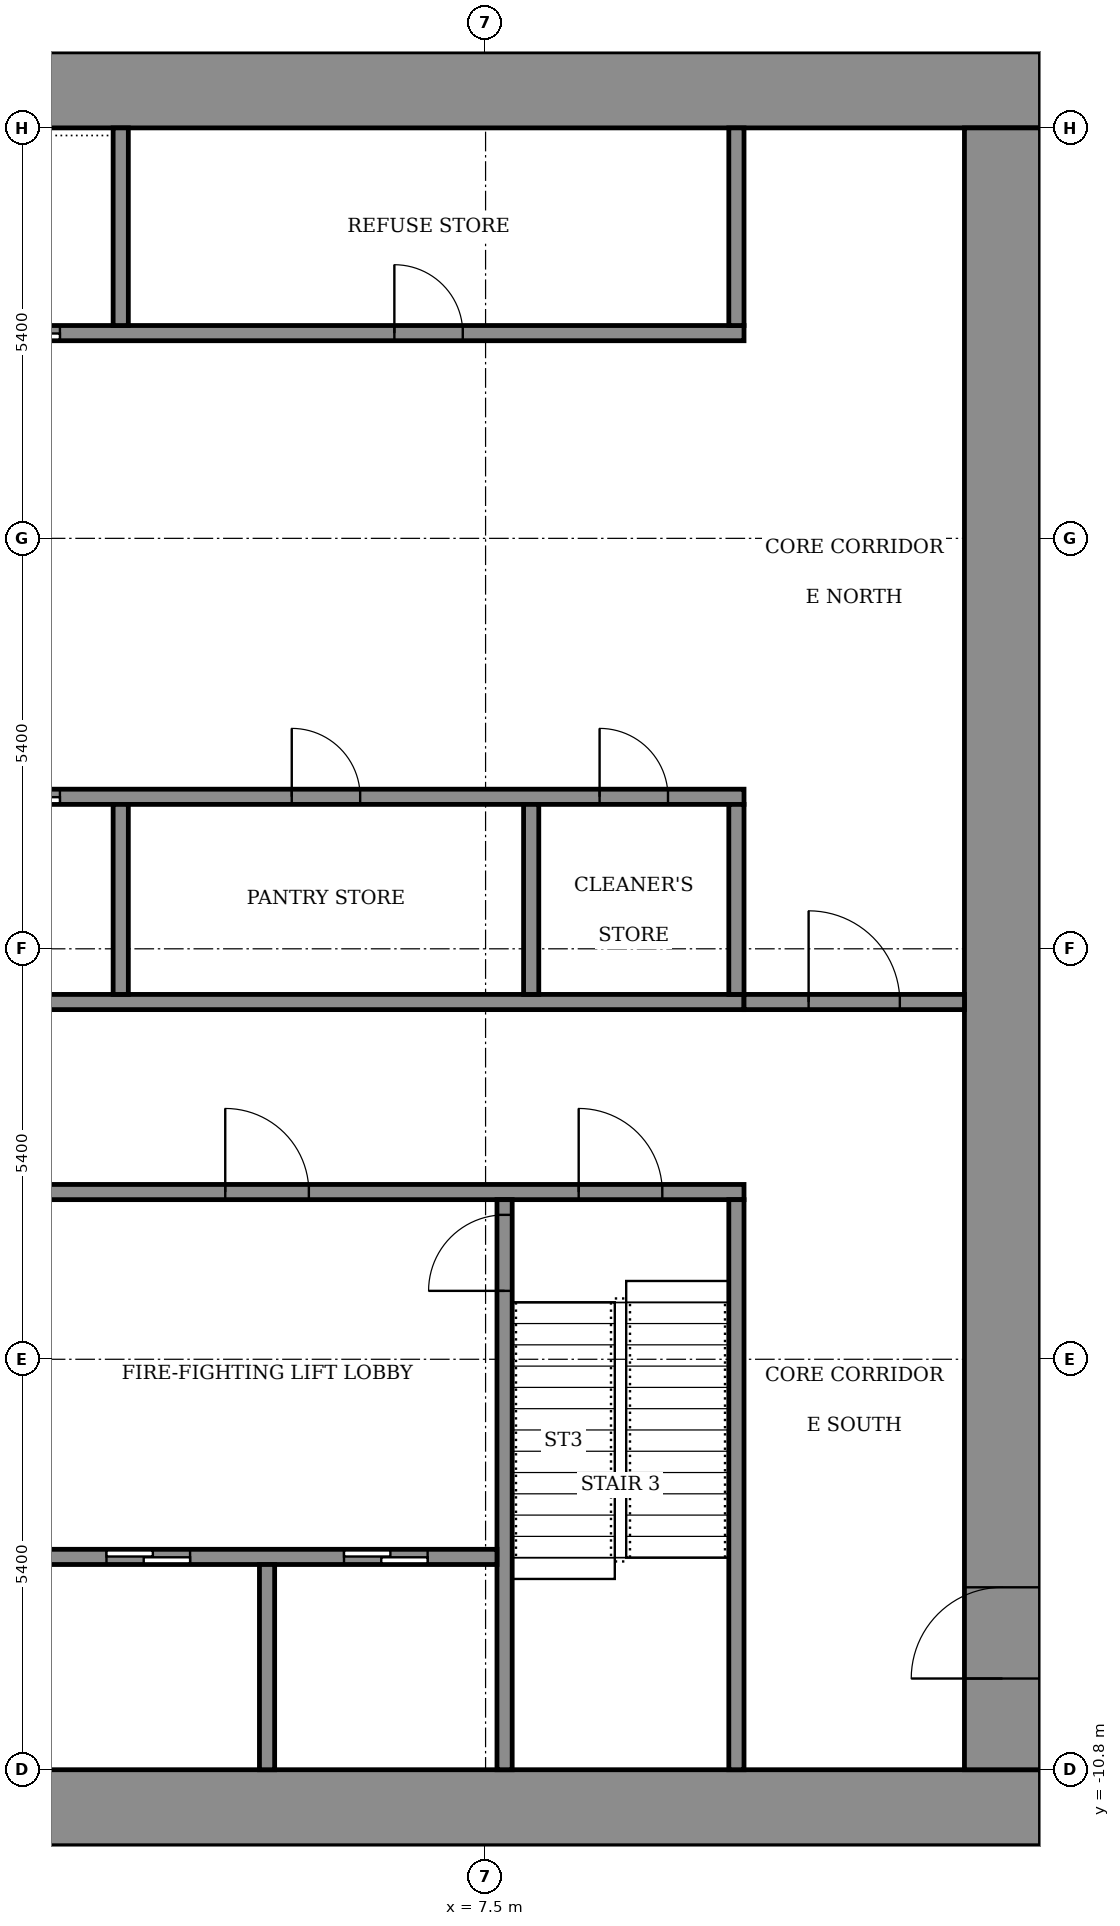
"""IFC4 building model, lengths in metres.
Left out: names, types, materials, properties, quantities, classifications, styles, units other than length and angle.
Written with IfcOpenShell. Run it as: python <this file> out.ifc"""

import sys

from ifc_helpers import new_model, si_unit, direction, frame, frame_2d, origin, place, context, subcontext, project, spatial, rectangle, extrude, element, fill, save


model = new_model("IFC4")
c1 = context("Model", 3, precision=1e-05, world=origin(), true_north=direction((0.0, 1.0)))
c2 = subcontext(c1, "Body", "Model", "MODEL_VIEW")
j1 = project(units=[si_unit("LENGTHUNIT", "METRE"), si_unit("PLANEANGLEUNIT", "RADIAN")], contexts=[c1])
p1 = place(None, origin())
s1 = spatial("IfcSite", under=j1, at=p1, CompositionType="ELEMENT")
p2 = place(p1, origin())
s2 = spatial("IfcBuilding", under=s1, at=p2, CompositionType="ELEMENT")
p3 = place(p2, frame((0.0, 0.0, 97.3)))
s3 = spatial("IfcBuildingStorey", under=s2, at=p3, CompositionType="ELEMENT", Elevation=97.3)
for number, where, z_axis, x_axis in (
    (1, (-14.8, -11.3, 0.0), (0.0, 0.0, 1.0), (1.0, 0.0, 0.0)),
    (2, (-14.8, 11.3, 0.0), (0.0, 0.0, 1.0), (1.0, 0.0, 0.0)),
):
    element("IfcWall", number, at=place(p3, frame(where, z_axis=z_axis, x_axis=x_axis)), inside=s3, PredefinedType="SHEAR", context=c2, shape_type="SweptSolid", body=[
        extrude(rectangle(XDim=29.6, YDim=1.0, at=frame_2d((14.8, 0.0))), origin(), (0.0, 0.0, 1.0), 4.6),
    ])
p4 = place(p3, frame((14.3, -10.8, 0.0), z_axis=(0.0, 0.0, 1.0), x_axis=(0.0, 1.0, 0.0)))
e3 = element("IfcWall", 3, at=p4, inside=s3, PredefinedType="SHEAR", context=c2, shape_type="SweptSolid", body=[
    extrude(rectangle(XDim=21.6, YDim=1.0, at=frame_2d((10.8, 0.0))), origin(), (0.0, 0.0, 1.0), 4.6),
])
p5 = place(p4, frame((1.2, 0.0, 0.0)))
e4 = element("IfcOpeningElement", 4, at=p5, cuts=e3, PredefinedType="OPENING", context=c2, shape_type="SweptSolid", body=[
    extrude(rectangle(XDim=1.2, YDim=2.1, at=frame_2d((0.6, 1.05))), frame((0.0, 0.51, 0.0), z_axis=(0.0, -1.0, 0.0), x_axis=(1.0, 0.0, 0.0)), (0.0, 0.0, 1.0), 1.02),
])
p6 = place(p3, frame((-10.9, -3.2, 0.0), z_axis=(0.0, 0.0, 1.0), x_axis=(1.0, 0.0, 0.0)))
e5 = element("IfcWall", 5, at=p6, inside=s3, PredefinedType="SHEAR", context=c2, shape_type="SweptSolid", body=[
    extrude(rectangle(XDim=21.8, YDim=0.2, at=frame_2d((10.9, 0.0))), origin(), (0.0, 0.0, 1.0), 4.05),
])
p7 = place(p6, frame((1.075, 0.0, 0.0)))
e6 = element("IfcOpeningElement", 6, at=p7, cuts=e5, PredefinedType="OPENING", context=c2, shape_type="SweptSolid", body=[
    extrude(rectangle(XDim=1.1, YDim=2.1, at=frame_2d((0.55, 1.05))), frame((0.0, 0.11, 0.0), z_axis=(0.0, -1.0, 0.0), x_axis=(1.0, 0.0, 0.0)), (0.0, 0.0, 1.0), 0.22),
])
p8 = place(p6, frame((10.325, 0.0, 0.0)))
e7 = element("IfcOpeningElement", 7, at=p8, cuts=e5, PredefinedType="OPENING", context=c2, shape_type="SweptSolid", body=[
    extrude(rectangle(XDim=1.1, YDim=2.1, at=frame_2d((0.55, 1.05))), frame((0.0, 0.11, 0.0), z_axis=(0.0, -1.0, 0.0), x_axis=(1.0, 0.0, 0.0)), (0.0, 0.0, 1.0), 0.22),
])
p9 = place(p6, frame((19.625, 0.0, 0.0)))
e8 = element("IfcOpeningElement", 8, at=p9, cuts=e5, PredefinedType="OPENING", context=c2, shape_type="SweptSolid", body=[
    extrude(rectangle(XDim=1.1, YDim=2.1, at=frame_2d((0.55, 1.05))), frame((0.0, 0.11, 0.0), z_axis=(0.0, -1.0, 0.0), x_axis=(1.0, 0.0, 0.0)), (0.0, 0.0, 1.0), 0.22),
])
p10 = place(p6, frame((5.7, 0.0, 0.0)))
e9 = element("IfcOpeningElement", 9, at=p10, cuts=e5, PredefinedType="OPENING", context=c2, shape_type="SweptSolid", body=[
    extrude(rectangle(XDim=1.1, YDim=2.1, at=frame_2d((0.55, 1.05))), frame((0.0, 0.11, 0.0), z_axis=(0.0, -1.0, 0.0), x_axis=(1.0, 0.0, 0.0)), (0.0, 0.0, 1.0), 0.22),
])
p11 = place(p6, frame((14.975, 0.0, 0.0)))
e10 = element("IfcOpeningElement", 10, at=p11, cuts=e5, PredefinedType="OPENING", context=c2, shape_type="SweptSolid", body=[
    extrude(rectangle(XDim=1.1, YDim=2.1, at=frame_2d((0.55, 1.05))), frame((0.0, 0.11, 0.0), z_axis=(0.0, -1.0, 0.0), x_axis=(1.0, 0.0, 0.0)), (0.0, 0.0, 1.0), 0.22),
])
p12 = place(p3, frame((-10.9, -0.7, 0.0), z_axis=(0.0, 0.0, 1.0), x_axis=(1.0, 0.0, 0.0)))
e11 = element("IfcWall", 11, at=p12, inside=s3, PredefinedType="SHEAR", context=c2, shape_type="SweptSolid", body=[
    extrude(rectangle(XDim=21.8, YDim=0.2, at=frame_2d((10.9, 0.0))), origin(), (0.0, 0.0, 1.0), 4.05),
])
p13 = place(p3, frame((-10.9, 2.0, 0.0), z_axis=(0.0, 0.0, 1.0), x_axis=(1.0, 0.0, 0.0)))
e12 = element("IfcWall", 12, at=p13, inside=s3, PredefinedType="SHEAR", context=c2, shape_type="SweptSolid", body=[
    extrude(rectangle(XDim=21.8, YDim=0.2, at=frame_2d((10.9, 0.0))), origin(), (0.0, 0.0, 1.0), 4.05),
])
p14 = place(p13, frame((0.9, 0.0, 0.0)))
e13 = element("IfcOpeningElement", 13, at=p14, cuts=e12, PredefinedType="OPENING", context=c2, shape_type="SweptSolid", body=[
    extrude(rectangle(XDim=1.1, YDim=2.1, at=frame_2d((0.55, 1.05))), frame((0.0, 0.11, 0.0), z_axis=(0.0, -1.0, 0.0), x_axis=(1.0, 0.0, 0.0)), (0.0, 0.0, 1.0), 0.22),
])
p15 = place(p13, frame((3.6, 0.0, 0.0)))
e14 = element("IfcOpeningElement", 14, at=p15, cuts=e12, PredefinedType="OPENING", context=c2, shape_type="SweptSolid", body=[
    extrude(rectangle(XDim=1.1, YDim=2.1, at=frame_2d((0.55, 1.05))), frame((0.0, 0.11, 0.0), z_axis=(0.0, -1.0, 0.0), x_axis=(1.0, 0.0, 0.0)), (0.0, 0.0, 1.0), 0.22),
])
p16 = place(p13, frame((6.3, 0.0, 0.0)))
e15 = element("IfcOpeningElement", 15, at=p16, cuts=e12, PredefinedType="OPENING", context=c2, shape_type="SweptSolid", body=[
    extrude(rectangle(XDim=1.1, YDim=2.1, at=frame_2d((0.55, 1.05))), frame((0.0, 0.11, 0.0), z_axis=(0.0, -1.0, 0.0), x_axis=(1.0, 0.0, 0.0)), (0.0, 0.0, 1.0), 0.22),
])
p17 = place(p13, frame((9.0, 0.0, 0.0)))
e16 = element("IfcOpeningElement", 16, at=p17, cuts=e12, PredefinedType="OPENING", context=c2, shape_type="SweptSolid", body=[
    extrude(rectangle(XDim=1.1, YDim=2.1, at=frame_2d((0.55, 1.05))), frame((0.0, 0.11, 0.0), z_axis=(0.0, -1.0, 0.0), x_axis=(1.0, 0.0, 0.0)), (0.0, 0.0, 1.0), 0.22),
])
p18 = place(p13, frame((11.7, 0.0, 0.0)))
e17 = element("IfcOpeningElement", 17, at=p18, cuts=e12, PredefinedType="OPENING", context=c2, shape_type="SweptSolid", body=[
    extrude(rectangle(XDim=1.1, YDim=2.1, at=frame_2d((0.55, 1.05))), frame((0.0, 0.11, 0.0), z_axis=(0.0, -1.0, 0.0), x_axis=(1.0, 0.0, 0.0)), (0.0, 0.0, 1.0), 0.22),
])
p19 = place(p13, frame((15.85, 0.0, 0.0)))
e18 = element("IfcOpeningElement", 18, at=p19, cuts=e12, PredefinedType="OPENING", context=c2, shape_type="SweptSolid", body=[
    extrude(rectangle(XDim=0.9, YDim=2.1, at=frame_2d((0.45, 1.05))), frame((0.0, 0.11, 0.0), z_axis=(0.0, -1.0, 0.0), x_axis=(1.0, 0.0, 0.0)), (0.0, 0.0, 1.0), 0.22),
])
p20 = place(p13, frame((19.9, 0.0, 0.0)))
e19 = element("IfcOpeningElement", 19, at=p20, cuts=e12, PredefinedType="OPENING", context=c2, shape_type="SweptSolid", body=[
    extrude(rectangle(XDim=0.9, YDim=2.1, at=frame_2d((0.45, 1.05))), frame((0.0, 0.11, 0.0), z_axis=(0.0, -1.0, 0.0), x_axis=(1.0, 0.0, 0.0)), (0.0, 0.0, 1.0), 0.22),
])
p21 = place(p3, frame((-10.9, 8.1, 0.0), z_axis=(0.0, 0.0, 1.0), x_axis=(1.0, 0.0, 0.0)))
e20 = element("IfcWall", 20, at=p21, inside=s3, PredefinedType="SHEAR", context=c2, shape_type="SweptSolid", body=[
    extrude(rectangle(XDim=21.8, YDim=0.2, at=frame_2d((10.9, 0.0))), origin(), (0.0, 0.0, 1.0), 4.05),
])
p22 = place(p21, frame((0.9, 0.0, 0.0)))
e21 = element("IfcOpeningElement", 21, at=p22, cuts=e20, PredefinedType="OPENING", context=c2, shape_type="SweptSolid", body=[
    extrude(rectangle(XDim=1.1, YDim=2.1, at=frame_2d((0.55, 1.05))), frame((0.0, 0.11, 0.0), z_axis=(0.0, -1.0, 0.0), x_axis=(1.0, 0.0, 0.0)), (0.0, 0.0, 1.0), 0.22),
])
p23 = place(p21, frame((3.6, 0.0, 0.0)))
e22 = element("IfcOpeningElement", 22, at=p23, cuts=e20, PredefinedType="OPENING", context=c2, shape_type="SweptSolid", body=[
    extrude(rectangle(XDim=1.1, YDim=2.1, at=frame_2d((0.55, 1.05))), frame((0.0, 0.11, 0.0), z_axis=(0.0, -1.0, 0.0), x_axis=(1.0, 0.0, 0.0)), (0.0, 0.0, 1.0), 0.22),
])
p24 = place(p21, frame((6.3, 0.0, 0.0)))
e23 = element("IfcOpeningElement", 23, at=p24, cuts=e20, PredefinedType="OPENING", context=c2, shape_type="SweptSolid", body=[
    extrude(rectangle(XDim=1.1, YDim=2.1, at=frame_2d((0.55, 1.05))), frame((0.0, 0.11, 0.0), z_axis=(0.0, -1.0, 0.0), x_axis=(1.0, 0.0, 0.0)), (0.0, 0.0, 1.0), 0.22),
])
p25 = place(p21, frame((9.0, 0.0, 0.0)))
e24 = element("IfcOpeningElement", 24, at=p25, cuts=e20, PredefinedType="OPENING", context=c2, shape_type="SweptSolid", body=[
    extrude(rectangle(XDim=1.1, YDim=2.1, at=frame_2d((0.55, 1.05))), frame((0.0, 0.11, 0.0), z_axis=(0.0, -1.0, 0.0), x_axis=(1.0, 0.0, 0.0)), (0.0, 0.0, 1.0), 0.22),
])
p26 = place(p21, frame((11.7, 0.0, 0.0)))
e25 = element("IfcOpeningElement", 25, at=p26, cuts=e20, PredefinedType="OPENING", context=c2, shape_type="SweptSolid", body=[
    extrude(rectangle(XDim=1.1, YDim=2.1, at=frame_2d((0.55, 1.05))), frame((0.0, 0.11, 0.0), z_axis=(0.0, -1.0, 0.0), x_axis=(1.0, 0.0, 0.0)), (0.0, 0.0, 1.0), 0.22),
])
p27 = place(p21, frame((17.2, 0.0, 0.0)))
e26 = element("IfcOpeningElement", 26, at=p27, cuts=e20, PredefinedType="OPENING", context=c2, shape_type="SweptSolid", body=[
    extrude(rectangle(XDim=0.9, YDim=2.1, at=frame_2d((0.45, 1.05))), frame((0.0, 0.11, 0.0), z_axis=(0.0, -1.0, 0.0), x_axis=(1.0, 0.0, 0.0)), (0.0, 0.0, 1.0), 0.22),
])
p28 = place(p3, frame((7.75, -10.8, 0.0), z_axis=(0.0, 0.0, 1.0), x_axis=(0.0, 1.0, 0.0)))
e27 = element("IfcWall", 27, at=p28, inside=s3, PredefinedType="SHEAR", context=c2, shape_type="SweptSolid", body=[
    extrude(rectangle(XDim=7.5, YDim=0.2, at=frame_2d((3.75, 0.0))), origin(), (0.0, 0.0, 1.0), 4.05),
])
p29 = place(p28, frame((6.3, 0.0, 0.0)))
e28 = element("IfcOpeningElement", 28, at=p29, cuts=e27, PredefinedType="OPENING", context=c2, shape_type="SweptSolid", body=[
    extrude(rectangle(XDim=1.0, YDim=2.1, at=frame_2d((0.5, 1.05))), frame((0.0, 0.11, 0.0), z_axis=(0.0, -1.0, 0.0), x_axis=(1.0, 0.0, 0.0)), (0.0, 0.0, 1.0), 0.22),
])
p30 = place(p3, frame((10.8, -10.8, 0.0), z_axis=(0.0, 0.0, 1.0), x_axis=(0.0, 1.0, 0.0)))
e29 = element("IfcWall", 29, at=p30, inside=s3, PredefinedType="SHEAR", context=c2, shape_type="SweptSolid", body=[
    extrude(rectangle(XDim=7.5, YDim=0.2, at=frame_2d((3.75, 0.0))), origin(), (0.0, 0.0, 1.0), 4.05),
])
p31 = place(p3, frame((1.6, -8.0, 0.0), z_axis=(0.0, 0.0, 1.0), x_axis=(1.0, 0.0, 0.0)))
e30 = element("IfcWall", 30, at=p31, inside=s3, PredefinedType="SHEAR", context=c2, shape_type="SweptSolid", body=[
    extrude(rectangle(XDim=6.05, YDim=0.2, at=frame_2d((3.025, 0.0))), origin(), (0.0, 0.0, 1.0), 4.05),
])
p32 = place(p31, frame((0.913, 0.0, 0.0)))
e31 = element("IfcOpeningElement", 31, at=p32, cuts=e30, PredefinedType="OPENING", context=c2, shape_type="SweptSolid", body=[
    extrude(rectangle(XDim=1.1, YDim=2.1, at=frame_2d((0.55, 1.05))), frame((0.0, 0.11, 0.0), z_axis=(0.0, -1.0, 0.0), x_axis=(1.0, 0.0, 0.0)), (0.0, 0.0, 1.0), 0.22),
])
p33 = place(p31, frame((4.038, 0.0, 0.0)))
e32 = element("IfcOpeningElement", 32, at=p33, cuts=e30, PredefinedType="OPENING", context=c2, shape_type="SweptSolid", body=[
    extrude(rectangle(XDim=1.1, YDim=2.1, at=frame_2d((0.55, 1.05))), frame((0.0, 0.11, 0.0), z_axis=(0.0, -1.0, 0.0), x_axis=(1.0, 0.0, 0.0)), (0.0, 0.0, 1.0), 0.22),
])
p34 = place(p3, frame((4.625, -10.8, 0.0), z_axis=(0.0, 0.0, 1.0), x_axis=(0.0, 1.0, 0.0)))
e33 = element("IfcWall", 33, at=p34, inside=s3, PredefinedType="SHEAR", context=c2, shape_type="SweptSolid", body=[
    extrude(rectangle(XDim=2.7, YDim=0.2, at=frame_2d((1.35, 0.0))), origin(), (0.0, 0.0, 1.0), 4.05),
])
p35 = place(p3, frame((2.7, -0.6, 0.0), z_axis=(0.0, 0.0, 1.0), x_axis=(0.0, 1.0, 0.0)))
e34 = element("IfcWall", 34, at=p35, inside=s3, PredefinedType="SHEAR", context=c2, shape_type="SweptSolid", body=[
    extrude(rectangle(XDim=2.5, YDim=0.2, at=frame_2d((1.25, 0.0))), origin(), (0.0, 0.0, 1.0), 4.05),
])
for number, where, z_axis, x_axis in (
    (35, (8.1, -0.6, 0.0), (0.0, 0.0, 1.0), (0.0, 1.0, 0.0)),
    (36, (10.8, -0.6, 0.0), (0.0, 0.0, 1.0), (0.0, 1.0, 0.0)),
):
    element("IfcWall", number, at=place(p3, frame(where, z_axis=z_axis, x_axis=x_axis)), inside=s3, PredefinedType="STANDARD", context=c2, shape_type="SweptSolid", body=[
        extrude(rectangle(XDim=2.5, YDim=0.2, at=frame_2d((1.25, 0.0))), origin(), (0.0, 0.0, 1.0), 4.05),
    ])
p36 = place(p3, frame((2.7, 8.2, 0.0), z_axis=(0.0, 0.0, 1.0), x_axis=(0.0, 1.0, 0.0)))
e37 = element("IfcWall", 37, at=p36, inside=s3, PredefinedType="SHEAR", context=c2, shape_type="SweptSolid", body=[
    extrude(rectangle(XDim=2.6, YDim=0.2, at=frame_2d((1.3, 0.0))), origin(), (0.0, 0.0, 1.0), 4.05),
])
p37 = place(p3, frame((10.8, 8.2, 0.0), z_axis=(0.0, 0.0, 1.0), x_axis=(0.0, 1.0, 0.0)))
e38 = element("IfcWall", 38, at=p37, inside=s3, PredefinedType="STANDARD", context=c2, shape_type="SweptSolid", body=[
    extrude(rectangle(XDim=2.6, YDim=0.2, at=frame_2d((1.3, 0.0))), origin(), (0.0, 0.0, 1.0), 4.05),
])
p38 = place(p3, frame((10.9, -0.7, 0.0), z_axis=(0.0, 0.0, 1.0), x_axis=(1.0, 0.0, 0.0)))
e39 = element("IfcWall", 39, at=p38, inside=s3, PredefinedType="STANDARD", context=c2, shape_type="SweptSolid", body=[
    extrude(rectangle(XDim=2.9, YDim=0.2, at=frame_2d((1.45, 0.0))), origin(), (0.0, 0.0, 1.0), 4.05),
])
p39 = place(p38, frame((0.85, 0.0, 0.0)))
e40 = element("IfcOpeningElement", 40, at=p39, cuts=e39, PredefinedType="OPENING", context=c2, shape_type="SweptSolid", body=[
    extrude(rectangle(XDim=1.2, YDim=2.1, at=frame_2d((0.6, 1.05))), frame((0.0, 0.11, 0.0), z_axis=(0.0, -1.0, 0.0), x_axis=(1.0, 0.0, 0.0)), (0.0, 0.0, 1.0), 0.22),
])
p40 = place(p5, origin())
e41 = element("IfcDoor", 41, at=p40, inside=s3, OperationType="DOUBLE_DOOR_SINGLE_SWING", PredefinedType="DOOR", context=c2, shape_type="SweptSolid", body=[
    extrude(rectangle(XDim=1.2, YDim=2.1, at=frame_2d((0.6, 1.05))), frame((0.0, 0.025, 0.0), z_axis=(0.0, -1.0, 0.0), x_axis=(1.0, 0.0, 0.0)), (0.0, 0.0, 1.0), 0.05),
])
fill(e4, e41)
p41 = place(p18, origin())
e42 = element("IfcDoor", 42, at=p41, inside=s3, OperationType="SLIDING_TO_LEFT", PredefinedType="DOOR", context=c2, shape_type="SweptSolid", body=[
    extrude(rectangle(XDim=1.1, YDim=2.1, at=frame_2d((0.55, 1.05))), frame((0.0, 0.025, 0.0), z_axis=(0.0, -1.0, 0.0), x_axis=(1.0, 0.0, 0.0)), (0.0, 0.0, 1.0), 0.05),
])
fill(e17, e42)
p42 = place(p26, origin())
e43 = element("IfcDoor", 43, at=p42, inside=s3, OperationType="SLIDING_TO_LEFT", PredefinedType="DOOR", context=c2, shape_type="SweptSolid", body=[
    extrude(rectangle(XDim=1.1, YDim=2.1, at=frame_2d((0.55, 1.05))), frame((0.0, 0.025, 0.0), z_axis=(0.0, -1.0, 0.0), x_axis=(1.0, 0.0, 0.0)), (0.0, 0.0, 1.0), 0.05),
])
fill(e25, e43)
p43 = place(p19, origin())
e44 = element("IfcDoor", 44, at=p43, inside=s3, OperationType="SINGLE_SWING_RIGHT", PredefinedType="DOOR", context=c2, shape_type="SweptSolid", body=[
    extrude(rectangle(XDim=0.9, YDim=2.1, at=frame_2d((0.45, 1.05))), frame((0.0, 0.025, 0.0), z_axis=(0.0, -1.0, 0.0), x_axis=(1.0, 0.0, 0.0)), (0.0, 0.0, 1.0), 0.05),
])
fill(e18, e44)
p44 = place(p20, origin())
e45 = element("IfcDoor", 45, at=p44, inside=s3, OperationType="SINGLE_SWING_RIGHT", PredefinedType="DOOR", context=c2, shape_type="SweptSolid", body=[
    extrude(rectangle(XDim=0.9, YDim=2.1, at=frame_2d((0.45, 1.05))), frame((0.0, 0.025, 0.0), z_axis=(0.0, -1.0, 0.0), x_axis=(1.0, 0.0, 0.0)), (0.0, 0.0, 1.0), 0.05),
])
fill(e19, e45)
p45 = place(p27, origin())
e46 = element("IfcDoor", 46, at=p45, inside=s3, OperationType="SINGLE_SWING_RIGHT", PredefinedType="DOOR", context=c2, shape_type="SweptSolid", body=[
    extrude(rectangle(XDim=0.9, YDim=2.1, at=frame_2d((0.45, 1.05))), frame((0.0, 0.025, 0.0), z_axis=(0.0, -1.0, 0.0), x_axis=(1.0, 0.0, 0.0)), (0.0, 0.0, 1.0), 0.05),
])
fill(e26, e46)
p46 = place(p32, origin())
e47 = element("IfcDoor", 47, at=p46, inside=s3, OperationType="SLIDING_TO_LEFT", PredefinedType="DOOR", context=c2, shape_type="SweptSolid", body=[
    extrude(rectangle(XDim=1.1, YDim=2.1, at=frame_2d((0.55, 1.05))), frame((0.0, 0.025, 0.0), z_axis=(0.0, -1.0, 0.0), x_axis=(1.0, 0.0, 0.0)), (0.0, 0.0, 1.0), 0.05),
])
fill(e31, e47)
p47 = place(p33, origin())
e48 = element("IfcDoor", 48, at=p47, inside=s3, OperationType="SLIDING_TO_LEFT", PredefinedType="DOOR", context=c2, shape_type="SweptSolid", body=[
    extrude(rectangle(XDim=1.1, YDim=2.1, at=frame_2d((0.55, 1.05))), frame((0.0, 0.025, 0.0), z_axis=(0.0, -1.0, 0.0), x_axis=(1.0, 0.0, 0.0)), (0.0, 0.0, 1.0), 0.05),
])
fill(e32, e48)
p48 = place(p9, origin())
e49 = element("IfcDoor", 49, at=p48, inside=s3, OperationType="SINGLE_SWING_RIGHT", PredefinedType="DOOR", context=c2, shape_type="SweptSolid", body=[
    extrude(rectangle(XDim=1.1, YDim=2.1, at=frame_2d((0.55, 1.05))), frame((0.0, 0.025, 0.0), z_axis=(0.0, -1.0, 0.0), x_axis=(1.0, 0.0, 0.0)), (0.0, 0.0, 1.0), 0.05),
])
fill(e8, e49)
p49 = place(p11, origin())
e50 = element("IfcDoor", 50, at=p49, inside=s3, OperationType="SINGLE_SWING_LEFT", PredefinedType="DOOR", context=c2, shape_type="SweptSolid", body=[
    extrude(rectangle(XDim=1.1, YDim=2.1, at=frame_2d((0.55, 1.05))), frame((0.0, 0.025, 0.0), z_axis=(0.0, -1.0, 0.0), x_axis=(1.0, 0.0, 0.0)), (0.0, 0.0, 1.0), 0.05),
])
fill(e10, e50)
p50 = place(p29, origin())
e51 = element("IfcDoor", 51, at=p50, inside=s3, OperationType="SINGLE_SWING_RIGHT", PredefinedType="DOOR", context=c2, shape_type="SweptSolid", body=[
    extrude(rectangle(XDim=1.0, YDim=2.1, at=frame_2d((0.5, 1.05))), frame((0.0, 0.025, 0.0), z_axis=(0.0, -1.0, 0.0), x_axis=(1.0, 0.0, 0.0)), (0.0, 0.0, 1.0), 0.05),
])
fill(e28, e51)
p51 = place(p39, origin())
e52 = element("IfcDoor", 52, at=p51, inside=s3, OperationType="SINGLE_SWING_LEFT", PredefinedType="DOOR", context=c2, shape_type="SweptSolid", body=[
    extrude(rectangle(XDim=1.2, YDim=2.1, at=frame_2d((0.6, 1.05))), frame((0.0, 0.025, 0.0), z_axis=(0.0, -1.0, 0.0), x_axis=(1.0, 0.0, 0.0)), (0.0, 0.0, 1.0), 0.05),
])
fill(e40, e52)
save(model, sys.argv[1])
